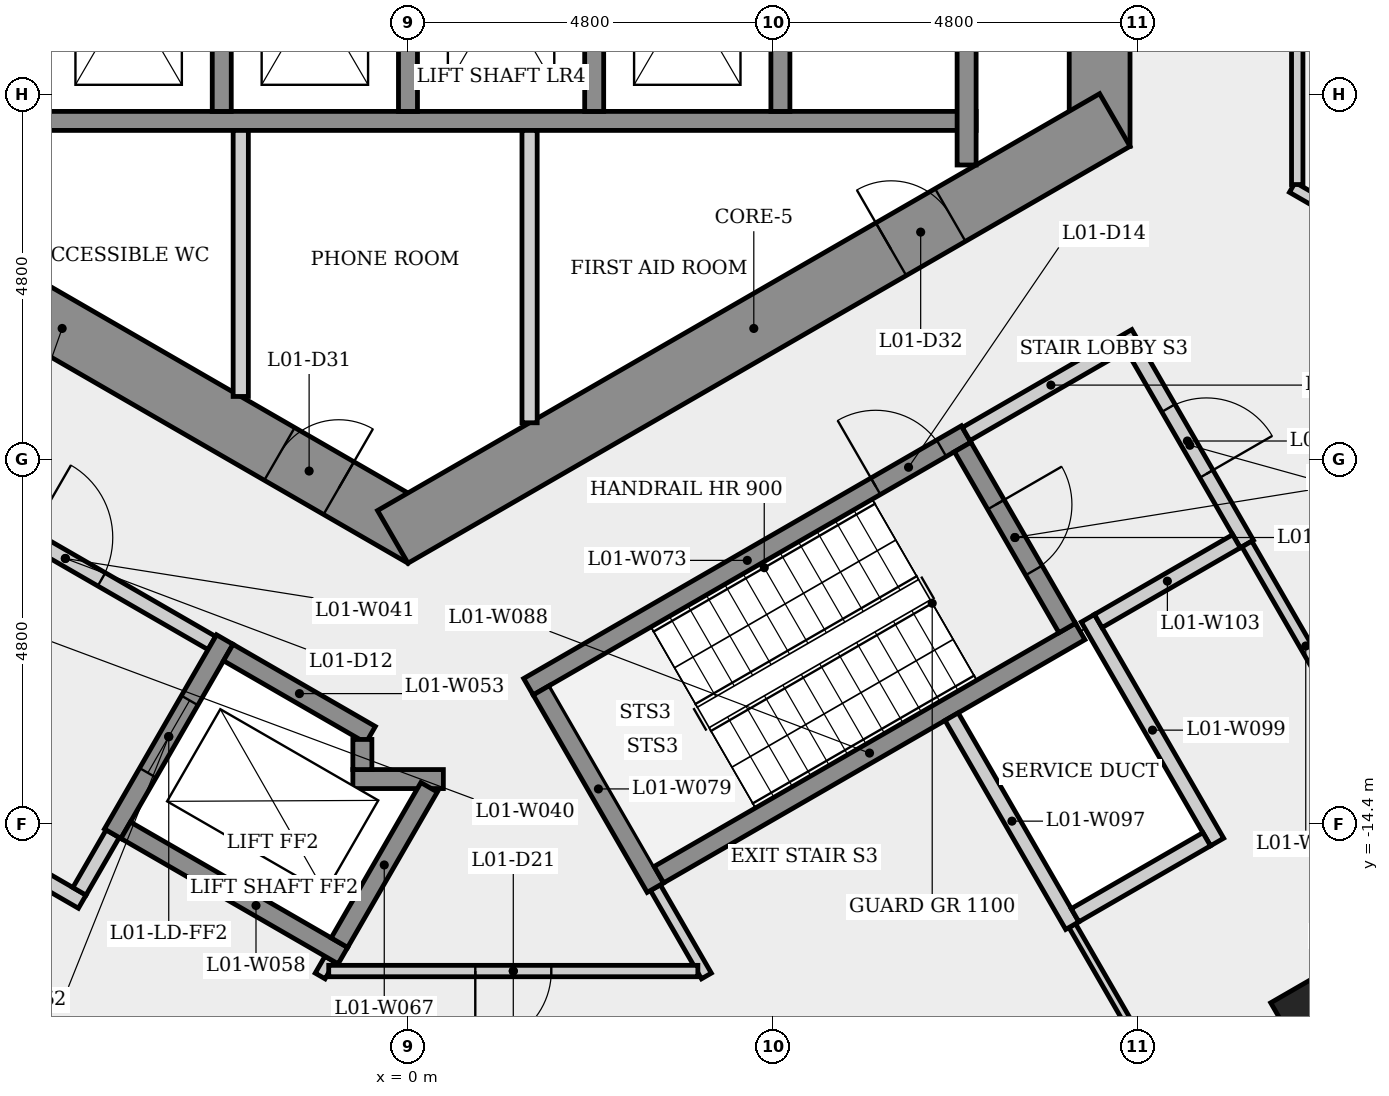
"""IFC4 building model, lengths in metres.
Left out: names, types, materials, properties, quantities, classifications, styles, units other than length and angle.
Written with IfcOpenShell. Run it as: python <this file> out.ifc"""

import sys

from ifc_helpers import new_model, si_unit, direction, frame, frame_2d, origin, origin_2d, place, context, subcontext, project, spatial, rectangle, extrude, element, fill, save


model = new_model("IFC4")
c1 = context("Model", 3, precision=1e-05, world=origin(), true_north=direction((0.0, 1.0)))
c2 = subcontext(c1, "Body", "Model", "MODEL_VIEW")
j1 = project(units=[si_unit("LENGTHUNIT", "METRE"), si_unit("PLANEANGLEUNIT", "RADIAN")], contexts=[c1])
p1 = place(None, origin())
s1 = spatial("IfcSite", under=j1, at=p1, CompositionType="ELEMENT")
p2 = place(p1, origin())
s2 = spatial("IfcBuilding", under=s1, at=p2, CompositionType="ELEMENT")
p3 = place(p2, frame((0.0, 0.0, 7.0)))
s3 = spatial("IfcBuildingStorey", under=s2, at=p3, CompositionType="ELEMENT", Elevation=7.0)
p4 = place(p3, frame((9.1, -5.485, 0.0), z_axis=(0.0, 0.0, 1.0), x_axis=(0.0, 1.0, 0.0)))
e1 = element("IfcWall", 1, at=p4, inside=s3, PredefinedType="SHEAR", context=c2, shape_type="SweptSolid", body=[
    extrude(rectangle(XDim=10.97, YDim=0.8, at=frame_2d((5.485, 0.0))), origin(), (0.0, 0.0, 1.0), 4.5),
])
p5 = place(p4, frame((4.685, 0.0, 0.0)))
e2 = element("IfcOpeningElement", 2, at=p5, cuts=e1, PredefinedType="OPENING", context=c2, shape_type="SweptSolid", body=[
    extrude(rectangle(XDim=1.6, YDim=2.1, at=frame_2d((0.8, 1.05))), frame((0.0, 0.41, 0.0), z_axis=(0.0, -1.0, 0.0), x_axis=(1.0, 0.0, 0.0)), (0.0, 0.0, 1.0), 0.82),
])
p6 = place(p3, frame((-9.3, -5.138, 0.0), z_axis=(0.0, 0.0, 1.0), x_axis=(0.866023993627, -0.500002442456, 0.0)))
e3 = element("IfcWall", 3, at=p6, inside=s3, PredefinedType="SHEAR", context=c2, shape_type="SweptSolid", body=[
    extrude(rectangle(XDim=10.97, YDim=0.8, at=frame_2d((5.485, 0.0))), origin(), (0.0, 0.0, 1.0), 4.5),
])
p7 = place(p6, frame((2.153, 0.0, 0.0)))
e4 = element("IfcOpeningElement", 4, at=p7, cuts=e3, PredefinedType="OPENING", context=c2, shape_type="SweptSolid", body=[
    extrude(rectangle(XDim=0.9, YDim=2.1, at=frame_2d((0.45, 1.05))), frame((0.0, 0.41, 0.0), z_axis=(0.0, -1.0, 0.0), x_axis=(1.0, 0.0, 0.0)), (0.0, 0.0, 1.0), 0.82),
])
p8 = place(p6, frame((8.787, 0.0, 0.0)))
e5 = element("IfcOpeningElement", 5, at=p8, cuts=e3, PredefinedType="OPENING", context=c2, shape_type="SweptSolid", body=[
    extrude(rectangle(XDim=0.9, YDim=2.1, at=frame_2d((0.45, 1.05))), frame((0.0, 0.41, 0.0), z_axis=(0.0, -1.0, 0.0), x_axis=(1.0, 0.0, 0.0)), (0.0, 0.0, 1.0), 0.82),
])
p9 = place(p3, frame((-0.2, -10.623, 0.0), z_axis=(0.0, 0.0, 1.0), x_axis=(0.866023993627, 0.500002442456, 0.0)))
e6 = element("IfcWall", 6, at=p9, inside=s3, PredefinedType="SHEAR", context=c2, shape_type="SweptSolid", body=[
    extrude(rectangle(XDim=10.97, YDim=0.8, at=frame_2d((5.485, 0.0))), origin(), (0.0, 0.0, 1.0), 4.5),
])
p10 = place(p9, frame((7.57, 0.0, 0.0)))
e7 = element("IfcOpeningElement", 7, at=p10, cuts=e6, PredefinedType="OPENING", context=c2, shape_type="SweptSolid", body=[
    extrude(rectangle(XDim=0.9, YDim=2.1, at=frame_2d((0.45, 1.05))), frame((0.0, 0.41, 0.0), z_axis=(0.0, -1.0, 0.0), x_axis=(1.0, 0.0, 0.0)), (0.0, 0.0, 1.0), 0.82),
])
p11 = place(p3, frame((12.171, -16.973, 0.0), z_axis=(0.0, 0.0, 1.0), x_axis=(0.5, -0.866025403784, 0.0)))
e8 = element("IfcColumn", 8, at=p11, inside=s3, PredefinedType="COLUMN", context=c2, shape_type="SweptSolid", body=[
    extrude(rectangle(XDim=1.2, YDim=1.2, at=origin_2d()), origin(), (0.0, 0.0, 1.0), 4.5),
])
p12 = place(p3, frame((-6.435, -9.795, 0.0), z_axis=(0.0, 0.0, 1.0), x_axis=(0.866012907634, -0.500021643343, 0.0)))
e9 = element("IfcWall", 9, at=p12, inside=s3, PredefinedType="PARTITIONING", context=c2, shape_type="SweptSolid", body=[
    extrude(rectangle(XDim=4.45, YDim=0.2, at=frame_2d((2.225, 0.0))), origin(), (0.0, 0.0, 1.0), 4.1),
])
p13 = place(p12, frame((1.675, 0.0, 0.0)))
e10 = element("IfcOpeningElement", 10, at=p13, cuts=e9, PredefinedType="OPENING", context=c2, shape_type="SweptSolid", body=[
    extrude(rectangle(XDim=1.1, YDim=2.1, at=frame_2d((0.55, 1.05))), frame((0.0, 0.11, 0.0), z_axis=(0.0, -1.0, 0.0), x_axis=(1.0, 0.0, 0.0)), (0.0, 0.0, 1.0), 0.22),
])
p14 = place(p3, frame((-7.225, -5.15, 0.0), z_axis=(0.0, 0.0, 1.0), x_axis=(1.0, 0.0, 0.0)))
e11 = element("IfcWall", 11, at=p14, inside=s3, PredefinedType="SHEAR", context=c2, shape_type="SweptSolid", body=[
    extrude(rectangle(XDim=14.7, YDim=0.25, at=frame_2d((7.35, 0.0))), origin(), (0.0, 0.0, 1.0), 4.1),
])
p15 = place(p3, frame((-4.286, -15.423, 0.0), z_axis=(0.0, 0.0, 1.0), x_axis=(-0.866025371046, 0.500000056704, 0.0)))
e12 = element("IfcWall", 12, at=p15, inside=s3, PredefinedType="PARTITIONING", context=c2, shape_type="SweptSolid", body=[
    extrude(rectangle(XDim=1.7, YDim=0.2, at=frame_2d((0.85, 0.0))), origin(), (0.0, 0.0, 1.0), 4.1),
])
p16 = place(p3, frame((-3.885, -14.529, 0.0), z_axis=(0.0, 0.0, 1.0), x_axis=(-0.499859285417, -0.866106630146, 0.0)))
e13 = element("IfcWall", 13, at=p16, inside=s3, PredefinedType="PARTITIONING", context=c2, shape_type="SweptSolid", body=[
    extrude(rectangle(XDim=0.875, YDim=0.2, at=frame_2d((0.438, 0.0))), origin(), (0.0, 0.0, 1.0), 4.1),
])
p17 = place(p3, frame((-2.41, -11.974, 0.0), z_axis=(0.0, 0.0, 1.0), x_axis=(-0.500001826776, -0.866024349092, 0.0)))
e14 = element("IfcWall", 14, at=p17, inside=s3, PredefinedType="SHEAR", context=c2, shape_type="SweptSolid", body=[
    extrude(rectangle(XDim=2.95, YDim=0.25, at=frame_2d((1.475, 0.0))), origin(), (0.0, 0.0, 1.0), 4.1),
])
p18 = place(p17, frame((0.925, 0.0, 0.0)))
e15 = element("IfcOpeningElement", 15, at=p18, cuts=e14, PredefinedType="OPENING", context=c2, shape_type="SweptSolid", body=[
    extrude(rectangle(XDim=1.1, YDim=2.1, at=frame_2d((0.55, 1.05))), frame((0.0, 0.135, 0.0), z_axis=(0.0, -1.0, 0.0), x_axis=(1.0, 0.0, 0.0)), (0.0, 0.0, 1.0), 0.27),
])
p19 = place(p3, frame((-2.364, -12.145, 0.0), z_axis=(0.0, 0.0, 1.0), x_axis=(0.86603892542, -0.499976579108, 0.0)))
e16 = element("IfcWall", 16, at=p19, inside=s3, PredefinedType="SHEAR", context=c2, shape_type="SweptSolid", body=[
    extrude(rectangle(XDim=2.162, YDim=0.25, at=frame_2d((1.081, 0.0))), origin(), (0.0, 0.0, 1.0), 4.1),
])
p20 = place(p3, frame((-2.45, -1.925, 0.0), z_axis=(0.0, 0.0, 1.0), x_axis=(0.0, -1.0, 0.0)))
e17 = element("IfcWall", 17, at=p20, inside=s3, PredefinedType="SHEAR", context=c2, shape_type="SweptSolid", body=[
    extrude(rectangle(XDim=3.1, YDim=0.25, at=frame_2d((1.55, 0.0))), origin(), (0.0, 0.0, 1.0), 4.5),
])
p21 = place(p3, frame((-2.2, -5.275, 0.0), z_axis=(0.0, 0.0, 1.0), x_axis=(0.0, -1.0, 0.0)))
e18 = element("IfcWall", 18, at=p21, inside=s3, PredefinedType="PARTITIONING", context=c2, shape_type="SweptSolid", body=[
    extrude(rectangle(XDim=3.501, YDim=0.2, at=frame_2d((1.75, 0.0))), origin(), (0.0, 0.0, 1.0), 4.1),
])
p22 = place(p3, frame((-1.155, -16.401, 0.0), z_axis=(0.0, 0.0, 1.0), x_axis=(0.500134748329, 0.865947592822, 0.0)))
e19 = element("IfcWall", 19, at=p22, inside=s3, PredefinedType="PARTITIONING", context=c2, shape_type="SweptSolid", body=[
    extrude(rectangle(XDim=0.256, YDim=0.15, at=frame_2d((0.128, 0.0))), origin(), (0.0, 0.0, 1.0), 4.1),
])
p23 = place(p3, frame((-0.856, -16.133, 0.0), z_axis=(0.0, 0.0, 1.0), x_axis=(-0.866021716278, 0.500006386895, 0.0)))
e20 = element("IfcWall", 20, at=p23, inside=s3, PredefinedType="SHEAR", context=c2, shape_type="SweptSolid", body=[
    extrude(rectangle(XDim=3.3, YDim=0.25, at=frame_2d((1.65, 0.0))), origin(), (0.0, 0.0, 1.0), 4.1),
])
p24 = place(p3, frame((-0.725, -13.81, 0.0), z_axis=(0.0, 0.0, 1.0), x_axis=(1.0, 0.0, 0.0)))
e21 = element("IfcWall", 21, at=p24, inside=s3, PredefinedType="SHEAR", context=c2, shape_type="SweptSolid", body=[
    extrude(rectangle(XDim=1.191, YDim=0.25, at=frame_2d((0.595, 0.0))), origin(), (0.0, 0.0, 1.0), 4.1),
])
p25 = place(p3, frame((-0.6, -13.289, 0.0), z_axis=(0.0, 0.0, 1.0), x_axis=(0.0, -1.0, 0.0)))
e22 = element("IfcWall", 22, at=p25, inside=s3, PredefinedType="SHEAR", context=c2, shape_type="SweptSolid", body=[
    extrude(rectangle(XDim=0.396, YDim=0.25, at=frame_2d((0.198, 0.0))), origin(), (0.0, 0.0, 1.0), 4.5),
])
p26 = place(p3, frame((0.0, -1.925, 0.0), z_axis=(0.0, 0.0, 1.0), x_axis=(0.0, -1.0, 0.0)))
e23 = element("IfcWall", 23, at=p26, inside=s3, PredefinedType="SHEAR", context=c2, shape_type="SweptSolid", body=[
    extrude(rectangle(XDim=3.1, YDim=0.25, at=frame_2d((1.55, 0.0))), origin(), (0.0, 0.0, 1.0), 4.5),
])
p27 = place(p3, frame((0.278, -13.918, 0.0), z_axis=(0.0, 0.0, 1.0), x_axis=(-0.49998806882, -0.866032292145, 0.0)))
e24 = element("IfcWall", 24, at=p27, inside=s3, PredefinedType="SHEAR", context=c2, shape_type="SweptSolid", body=[
    extrude(rectangle(XDim=2.36, YDim=0.25, at=frame_2d((1.18, 0.0))), origin(), (0.0, 0.0, 1.0), 4.5),
])
p28 = place(p3, frame((1.6, -5.275, 0.0), z_axis=(0.0, 0.0, 1.0), x_axis=(0.0, -1.0, 0.0)))
e25 = element("IfcWall", 25, at=p28, inside=s3, PredefinedType="PARTITIONING", context=c2, shape_type="SweptSolid", body=[
    extrude(rectangle(XDim=3.847, YDim=0.2, at=frame_2d((1.924, 0.0))), origin(), (0.0, 0.0, 1.0), 4.1),
])
p29 = place(p3, frame((1.585, -12.595, 0.0), z_axis=(0.0, 0.0, 1.0), x_axis=(0.866036417653, 0.499980922934, 0.0)))
e26 = element("IfcWall", 26, at=p29, inside=s3, PredefinedType="SHEAR", context=c2, shape_type="SweptSolid", body=[
    extrude(rectangle(XDim=6.65, YDim=0.25, at=frame_2d((3.325, 0.0))), origin(), (0.0, 0.0, 1.0), 4.1),
])
p30 = place(p29, frame((5.275, 0.0, 0.0)))
e27 = element("IfcOpeningElement", 27, at=p30, cuts=e26, PredefinedType="OPENING", context=c2, shape_type="SweptSolid", body=[
    extrude(rectangle(XDim=1.0, YDim=2.1, at=frame_2d((0.5, 1.05))), frame((0.0, 0.135, 0.0), z_axis=(0.0, -1.0, 0.0), x_axis=(1.0, 0.0, 0.0)), (0.0, 0.0, 1.0), 0.27),
])
p31 = place(p3, frame((2.45, -1.925, 0.0), z_axis=(0.0, 0.0, 1.0), x_axis=(0.0, -1.0, 0.0)))
e28 = element("IfcWall", 28, at=p31, inside=s3, PredefinedType="SHEAR", context=c2, shape_type="SweptSolid", body=[
    extrude(rectangle(XDim=3.1, YDim=0.25, at=frame_2d((1.55, 0.0))), origin(), (0.0, 0.0, 1.0), 4.5),
])
p32 = place(p3, frame((3.256, -15.239, 0.0), z_axis=(0.0, 0.0, 1.0), x_axis=(0.499974444137, -0.866040157966, 0.0)))
e29 = element("IfcWall", 29, at=p32, inside=s3, PredefinedType="PARTITIONING", context=c2, shape_type="SweptSolid", body=[
    extrude(rectangle(XDim=1.342, YDim=0.15, at=frame_2d((0.671, 0.0))), origin(), (0.0, 0.0, 1.0), 4.1),
])
p33 = place(p3, frame((3.256, -15.239, 0.0), z_axis=(0.0, 0.0, 1.0), x_axis=(-0.50002537861, 0.866010750942, 0.0)))
e30 = element("IfcWall", 30, at=p33, inside=s3, PredefinedType="SHEAR", context=c2, shape_type="SweptSolid", body=[
    extrude(rectangle(XDim=3.0, YDim=0.25, at=frame_2d((1.5, 0.0))), origin(), (0.0, 0.0, 1.0), 4.1),
])
p34 = place(p3, frame((3.814, -16.336, 0.0), z_axis=(0.0, 0.0, 1.0), x_axis=(-1.0, 0.0, 0.0)))
e31 = element("IfcWall", 31, at=p34, inside=s3, PredefinedType="PARTITIONING", context=c2, shape_type="SweptSolid", body=[
    extrude(rectangle(XDim=4.857, YDim=0.15, at=frame_2d((2.428, 0.0))), origin(), (0.0, 0.0, 1.0), 4.1),
])
p35 = place(p34, frame((1.928, 0.0, 0.0)))
e32 = element("IfcOpeningElement", 32, at=p35, cuts=e31, PredefinedType="OPENING", context=c2, shape_type="SweptSolid", body=[
    extrude(rectangle(XDim=1.0, YDim=2.1, at=frame_2d((0.5, 1.05))), frame((0.0, 0.085, 0.0), z_axis=(0.0, -1.0, 0.0), x_axis=(1.0, 0.0, 0.0)), (0.0, 0.0, 1.0), 0.17),
])
p36 = place(p3, frame((4.9, -1.925, 0.0), z_axis=(0.0, 0.0, 1.0), x_axis=(0.0, -1.0, 0.0)))
e33 = element("IfcWall", 33, at=p36, inside=s3, PredefinedType="SHEAR", context=c2, shape_type="SweptSolid", body=[
    extrude(rectangle(XDim=3.1, YDim=0.25, at=frame_2d((1.55, 0.0))), origin(), (0.0, 0.0, 1.0), 4.5),
])
p37 = place(p3, frame((3.301, -15.068, 0.0), z_axis=(0.0, 0.0, 1.0), x_axis=(0.866035036182, 0.499983315828, 0.0)))
e34 = element("IfcWall", 34, at=p37, inside=s3, PredefinedType="SHEAR", context=c2, shape_type="SweptSolid", body=[
    extrude(rectangle(XDim=6.4, YDim=0.25, at=frame_2d((3.2, 0.0))), origin(), (0.0, 0.0, 1.0), 4.1),
])
p38 = place(p3, frame((7.298, -9.441, 0.0), z_axis=(0.0, 0.0, 1.0), x_axis=(0.500034990121, -0.866005201286, 0.0)))
e35 = element("IfcWall", 35, at=p38, inside=s3, PredefinedType="SHEAR", context=c2, shape_type="SweptSolid", body=[
    extrude(rectangle(XDim=2.75, YDim=0.25, at=frame_2d((1.375, 0.0))), origin(), (0.0, 0.0, 1.0), 4.1),
])
p39 = place(p38, frame((0.875, 0.0, 0.0)))
e36 = element("IfcOpeningElement", 36, at=p39, cuts=e35, PredefinedType="OPENING", context=c2, shape_type="SweptSolid", body=[
    extrude(rectangle(XDim=1.0, YDim=2.1, at=frame_2d((0.5, 1.05))), frame((0.0, 0.135, 0.0), z_axis=(0.0, -1.0, 0.0), x_axis=(1.0, 0.0, 0.0)), (0.0, 0.0, 1.0), 0.27),
])
p40 = place(p3, frame((7.344, -9.27, 0.0), z_axis=(0.0, 0.0, 1.0), x_axis=(0.866005588531, 0.500034319456, 0.0)))
e37 = element("IfcWall", 37, at=p40, inside=s3, PredefinedType="PARTITIONING", context=c2, shape_type="SweptSolid", body=[
    extrude(rectangle(XDim=2.575, YDim=0.2, at=frame_2d((1.288, 0.0))), origin(), (0.0, 0.0, 1.0), 4.1),
])
p41 = place(p3, frame((7.35, -1.925, 0.0), z_axis=(0.0, 0.0, 1.0), x_axis=(0.0, -1.0, 0.0)))
e38 = element("IfcWall", 38, at=p41, inside=s3, PredefinedType="SHEAR", context=c2, shape_type="SweptSolid", body=[
    extrude(rectangle(XDim=3.805, YDim=0.25, at=frame_2d((1.903, 0.0))), origin(), (0.0, 0.0, 1.0), 4.1),
])
p42 = place(p3, frame((8.74, -15.738, 0.0), z_axis=(0.0, 0.0, 1.0), x_axis=(0.500026738915, -0.866009965514, 0.0)))
e39 = element("IfcWall", 39, at=p42, inside=s3, PredefinedType="PARTITIONING", context=c2, shape_type="SweptSolid", body=[
    extrude(rectangle(XDim=3.681, YDim=0.1, at=frame_2d((1.84, 0.0))), origin(), (0.0, 0.0, 1.0), 4.1),
])
p43 = place(p3, frame((8.74, -15.739, 0.0), z_axis=(0.0, 0.0, 1.0), x_axis=(-0.500017526161, 0.866015284814, 0.0)))
e40 = element("IfcWall", 40, at=p43, inside=s3, PredefinedType="PLUMBINGWALL", context=c2, shape_type="SweptSolid", body=[
    extrude(rectangle(XDim=3.175, YDim=0.2, at=frame_2d((1.588, 0.0))), origin(), (0.0, 0.0, 1.0), 4.1),
])
p44 = place(p3, frame((8.945, -11.694, 0.0), z_axis=(0.0, 0.0, 1.0), x_axis=(0.500062241894, -0.865989465428, 0.0)))
e41 = element("IfcWall", 41, at=p44, inside=s3, PredefinedType="PLUMBINGWALL", context=c2, shape_type="SweptSolid", body=[
    extrude(rectangle(XDim=3.4, YDim=0.2, at=frame_2d((1.7, 0.0))), origin(), (0.0, 0.0, 1.0), 4.1),
])
p45 = place(p3, frame((9.537, -8.119, 0.0), z_axis=(0.0, 0.0, 1.0), x_axis=(0.499990139034, -0.866031096941, 0.0)))
e42 = element("IfcWall", 42, at=p45, inside=s3, PredefinedType="PARTITIONING", context=c2, shape_type="SweptSolid", body=[
    extrude(rectangle(XDim=3.0, YDim=0.2, at=frame_2d((1.5, 0.0))), origin(), (0.0, 0.0, 1.0), 4.1),
])
p46 = place(p45, frame((0.935, 0.0, 0.0)))
e43 = element("IfcOpeningElement", 43, at=p46, cuts=e42, PredefinedType="OPENING", context=c2, shape_type="SweptSolid", body=[
    extrude(rectangle(XDim=1.0, YDim=2.1, at=frame_2d((0.5, 1.05))), frame((0.0, 0.11, 0.0), z_axis=(0.0, -1.0, 0.0), x_axis=(1.0, 0.0, 0.0)), (0.0, 0.0, 1.0), 0.22),
])
p47 = place(p3, frame((10.509, -14.602, 0.0), z_axis=(0.0, 0.0, 1.0), x_axis=(-0.866010750942, -0.50002537861, 0.0)))
e44 = element("IfcWall", 44, at=p47, inside=s3, PredefinedType="PLUMBINGWALL", context=c2, shape_type="SweptSolid", body=[
    extrude(rectangle(XDim=2.0, YDim=0.2, at=frame_2d((1.0, 0.0))), origin(), (0.0, 0.0, 1.0), 4.1),
])
p48 = place(p3, frame((10.901, -10.681, 0.0), z_axis=(0.0, 0.0, 1.0), x_axis=(-0.866009402589, -0.500027713859, 0.0)))
e45 = element("IfcWall", 45, at=p48, inside=s3, PredefinedType="PARTITIONING", context=c2, shape_type="SweptSolid", body=[
    extrude(rectangle(XDim=2.1, YDim=0.2, at=frame_2d((1.05, 0.0))), origin(), (0.0, 0.0, 1.0), 4.1),
])
p49 = place(p3, frame((11.635, -6.025, 0.0), z_axis=(0.0, 0.0, 1.0), x_axis=(0.866115353951, -0.499844169366, 0.0)))
e46 = element("IfcWall", 46, at=p49, inside=s3, PredefinedType="PARTITIONING", context=c2, shape_type="SweptSolid", body=[
    extrude(rectangle(XDim=0.347, YDim=0.15, at=frame_2d((0.174, 0.0))), origin(), (0.0, 0.0, 1.0), 4.1),
])
p50 = place(p3, frame((11.7, 6.137, 0.0), z_axis=(0.0, 0.0, 1.0), x_axis=(0.0, -1.0, 0.0)))
e47 = element("IfcWall", 47, at=p50, inside=s3, PredefinedType="PARTITIONING", context=c2, shape_type="SweptSolid", body=[
    extrude(rectangle(XDim=12.125, YDim=0.15, at=frame_2d((6.062, 0.0))), origin(), (0.0, 0.0, 1.0), 4.1),
])
p51 = place(p50, frame((5.6, 0.0, 0.0)))
e48 = element("IfcOpeningElement", 48, at=p51, cuts=e47, PredefinedType="OPENING", context=c2, shape_type="SweptSolid", body=[
    extrude(rectangle(XDim=1.0, YDim=2.1, at=frame_2d((0.5, 1.05))), frame((0.0, 0.085, 0.0), z_axis=(0.0, -1.0, 0.0), x_axis=(1.0, 0.0, 0.0)), (0.0, 0.0, 1.0), 0.17),
])
p52 = place(p3, frame((12.587, -13.401, 0.0), z_axis=(0.0, 0.0, 1.0), x_axis=(-0.499952049853, 0.866053086045, 0.0)))
e49 = element("IfcWall", 49, at=p52, inside=s3, PredefinedType="PARTITIONING", context=c2, shape_type="SweptSolid", body=[
    extrude(rectangle(XDim=3.099, YDim=0.15, at=frame_2d((1.549, 0.0))), origin(), (0.0, 0.0, 1.0), 4.1),
])
p53 = place(p13, origin())
e50 = element("IfcDoor", 50, at=p53, inside=s3, OperationType="SINGLE_SWING_LEFT", PredefinedType="DOOR", context=c2, shape_type="SweptSolid", body=[
    extrude(rectangle(XDim=1.1, YDim=2.1, at=frame_2d((0.55, 1.05))), frame((0.0, 0.025, 0.0), z_axis=(0.0, -1.0, 0.0), x_axis=(1.0, 0.0, 0.0)), (0.0, 0.0, 1.0), 0.05),
])
fill(e10, e50)
p54 = place(p18, origin())
e51 = element("IfcDoor", 51, at=p54, inside=s3, OperationType="SLIDING_TO_LEFT", PredefinedType="DOOR", context=c2, shape_type="SweptSolid", body=[
    extrude(rectangle(XDim=1.1, YDim=2.1, at=frame_2d((0.55, 1.05))), frame((0.0, 0.025, 0.0), z_axis=(0.0, -1.0, 0.0), x_axis=(1.0, 0.0, 0.0)), (0.0, 0.0, 1.0), 0.05),
])
fill(e15, e51)
p55 = place(p30, origin())
e52 = element("IfcDoor", 52, at=p55, inside=s3, OperationType="SINGLE_SWING_LEFT", PredefinedType="DOOR", context=c2, shape_type="SweptSolid", body=[
    extrude(rectangle(XDim=1.0, YDim=2.1, at=frame_2d((0.5, 1.05))), frame((0.0, 0.025, 0.0), z_axis=(0.0, -1.0, 0.0), x_axis=(1.0, 0.0, 0.0)), (0.0, 0.0, 1.0), 0.05),
])
fill(e27, e52)
p56 = place(p46, origin())
e53 = element("IfcDoor", 53, at=p56, inside=s3, OperationType="SINGLE_SWING_RIGHT", PredefinedType="DOOR", context=c2, shape_type="SweptSolid", body=[
    extrude(rectangle(XDim=1.0, YDim=2.1, at=frame_2d((0.5, 1.05))), frame((0.0, 0.025, 0.0), z_axis=(0.0, -1.0, 0.0), x_axis=(1.0, 0.0, 0.0)), (0.0, 0.0, 1.0), 0.05),
])
fill(e43, e53)
p57 = place(p39, origin())
e54 = element("IfcDoor", 54, at=p57, inside=s3, OperationType="SINGLE_SWING_LEFT", PredefinedType="DOOR", context=c2, shape_type="SweptSolid", body=[
    extrude(rectangle(XDim=1.0, YDim=2.1, at=frame_2d((0.5, 1.05))), frame((0.0, 0.025, 0.0), z_axis=(0.0, -1.0, 0.0), x_axis=(1.0, 0.0, 0.0)), (0.0, 0.0, 1.0), 0.05),
])
fill(e36, e54)
p58 = place(p35, origin())
e55 = element("IfcDoor", 55, at=p58, inside=s3, OperationType="SINGLE_SWING_RIGHT", PredefinedType="DOOR", context=c2, shape_type="SweptSolid", body=[
    extrude(rectangle(XDim=1.0, YDim=2.1, at=frame_2d((0.5, 1.05))), frame((0.0, 0.025, 0.0), z_axis=(0.0, -1.0, 0.0), x_axis=(1.0, 0.0, 0.0)), (0.0, 0.0, 1.0), 0.05),
])
fill(e32, e55)
p59 = place(p8, origin())
e56 = element("IfcDoor", 56, at=p59, inside=s3, OperationType="SINGLE_SWING_RIGHT", PredefinedType="DOOR", context=c2, shape_type="SweptSolid", body=[
    extrude(rectangle(XDim=0.9, YDim=2.1, at=frame_2d((0.45, 1.05))), frame((0.0, 0.025, 0.0), z_axis=(0.0, -1.0, 0.0), x_axis=(1.0, 0.0, 0.0)), (0.0, 0.0, 1.0), 0.05),
])
fill(e5, e56)
p60 = place(p10, origin())
e57 = element("IfcDoor", 57, at=p60, inside=s3, OperationType="SINGLE_SWING_LEFT", PredefinedType="DOOR", context=c2, shape_type="SweptSolid", body=[
    extrude(rectangle(XDim=0.9, YDim=2.1, at=frame_2d((0.45, 1.05))), frame((0.0, 0.025, 0.0), z_axis=(0.0, -1.0, 0.0), x_axis=(1.0, 0.0, 0.0)), (0.0, 0.0, 1.0), 0.05),
])
fill(e7, e57)
save(model, sys.argv[1])
